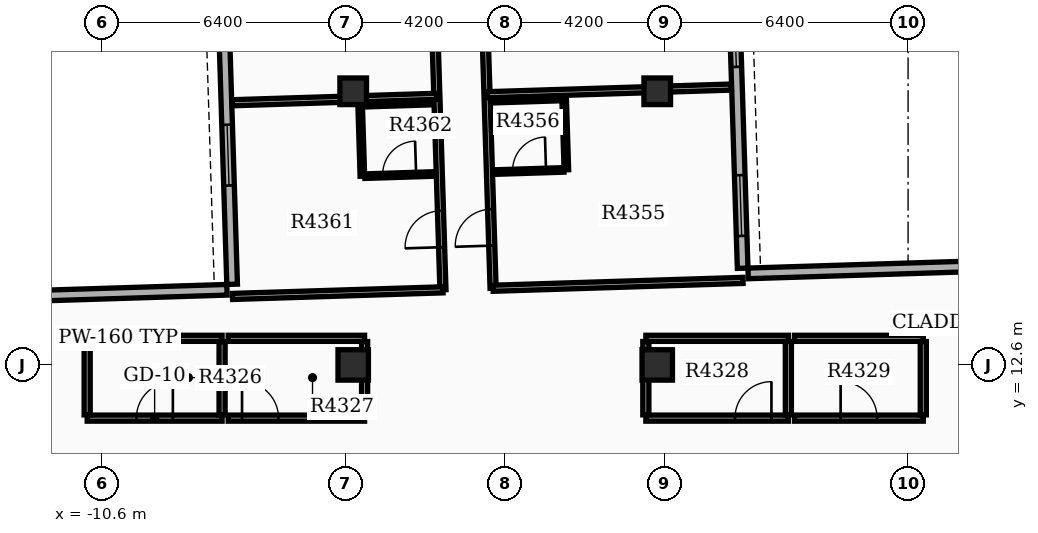
"""IFC4 building model, lengths in metres.
Left out: names, types, materials, properties, quantities, classifications, styles, units other than length and angle.
Written with IfcOpenShell. Run it as: python <this file> out.ifc"""

import sys

from ifc_helpers import new_model, si_unit, direction, frame, frame_2d, origin, origin_2d, place, context, subcontext, project, spatial, rectangle, extrude, element, fill, save


model = new_model("IFC4")
c1 = context("Model", 3, precision=1e-05, world=origin(), true_north=direction((0.0, 1.0)))
c2 = subcontext(c1, "Body", "Model", "MODEL_VIEW")
j1 = project(units=[si_unit("LENGTHUNIT", "METRE"), si_unit("PLANEANGLEUNIT", "RADIAN")], contexts=[c1])
p1 = place(None, origin())
s1 = spatial("IfcSite", under=j1, at=p1, CompositionType="ELEMENT")
p2 = place(p1, origin())
s2 = spatial("IfcBuilding", under=s1, at=p2, CompositionType="ELEMENT")
p3 = place(p2, frame((0.0, 0.0, 273.3)))
s3 = spatial("IfcBuildingStorey", under=s2, at=p3, CompositionType="ELEMENT", Elevation=273.3)
for number, where, z_axis, x_axis in (
    (1, (4.0, 12.6, 0.0), (0.0, 0.0, 1.0), (1.0, 0.0, 0.0)),
    (2, (-4.0, 12.6, 0.0), (0.0, 0.0, 1.0), (1.0, 0.0, 0.0)),
):
    element("IfcColumn", number, at=place(p3, frame(where, z_axis=z_axis, x_axis=x_axis)), inside=s3, PredefinedType="COLUMN", context=c2, shape_type="SweptSolid", body=[
        extrude(rectangle(XDim=0.8, YDim=0.8, at=origin_2d()), origin(), (0.0, 0.0, 1.0), 3.9),
    ])
for number, where, z_axis, x_axis in (
    (3, (-4.0, 19.8, 0.0), (0.0, 0.0, 1.0), (1.0, 0.0, 0.0)),
    (4, (4.0, 19.8, 0.0), (0.0, 0.0, 1.0), (1.0, 0.0, 0.0)),
):
    element("IfcColumn", number, at=place(p3, frame(where, z_axis=z_axis, x_axis=x_axis)), inside=s3, PredefinedType="COLUMN", context=c2, shape_type="SweptSolid", body=[
        extrude(rectangle(XDim=0.7, YDim=0.7, at=origin_2d()), origin(), (0.0, 0.0, 1.0), 3.9),
    ])
p4 = place(p3, frame((6.247, 15.144, 0.0), z_axis=(0.0, 0.0, 1.0), x_axis=(-0.031406376864, 0.999506698073, 0.0)))
e5 = element("IfcWall", 5, at=p4, inside=s3, PredefinedType="STANDARD", context=c2, shape_type="SweptSolid", body=[
    extrude(rectangle(XDim=14.7, YDim=0.28, at=frame_2d((7.35, 0.0))), origin(), (0.0, 0.0, 1.0), 3.18),
])
p5 = place(p4, frame((0.85, 0.0, 0.8)))
e6 = element("IfcOpeningElement", 6, at=p5, cuts=e5, PredefinedType="OPENING", context=c2, shape_type="SweptSolid", body=[
    extrude(rectangle(XDim=1.6, YDim=1.7, at=frame_2d((0.8, 0.85))), frame((0.0, 0.15, 0.0), z_axis=(0.0, -1.0, 0.0), x_axis=(1.0, 0.0, 0.0)), (0.0, 0.0, 1.0), 0.3),
])
p6 = place(p4, frame((5.3, 0.0, 0.8)))
e7 = element("IfcOpeningElement", 7, at=p6, cuts=e5, PredefinedType="OPENING", context=c2, shape_type="SweptSolid", body=[
    extrude(rectangle(XDim=1.6, YDim=1.7, at=frame_2d((0.8, 0.85))), frame((0.0, 0.15, 0.0), z_axis=(0.0, -1.0, 0.0), x_axis=(1.0, 0.0, 0.0)), (0.0, 0.0, 1.0), 0.3),
])
p7 = place(p4, frame((10.75, 0.0, 0.8)))
e8 = element("IfcOpeningElement", 8, at=p7, cuts=e5, PredefinedType="OPENING", context=c2, shape_type="SweptSolid", body=[
    extrude(rectangle(XDim=1.6, YDim=1.7, at=frame_2d((0.8, 0.85))), frame((0.0, 0.15, 0.0), z_axis=(0.0, -1.0, 0.0), x_axis=(1.0, 0.0, 0.0)), (0.0, 0.0, 1.0), 0.3),
])
p8 = place(p3, frame((-7.648, 29.414, 0.0), z_axis=(0.0, 0.0, 1.0), x_axis=(0.031405855522, -0.999506714454, 0.0)))
e9 = element("IfcWall", 9, at=p8, inside=s3, PredefinedType="STANDARD", context=c2, shape_type="SweptSolid", body=[
    extrude(rectangle(XDim=14.7, YDim=0.28, at=frame_2d((7.35, 0.0))), origin(), (0.0, 0.0, 1.0), 3.18),
])
p9 = place(p8, frame((0.85, 0.0, 0.8)))
e10 = element("IfcOpeningElement", 10, at=p9, cuts=e9, PredefinedType="OPENING", context=c2, shape_type="SweptSolid", body=[
    extrude(rectangle(XDim=1.6, YDim=1.7, at=frame_2d((0.8, 0.85))), frame((0.0, 0.15, 0.0), z_axis=(0.0, -1.0, 0.0), x_axis=(1.0, 0.0, 0.0)), (0.0, 0.0, 1.0), 0.3),
])
p10 = place(p8, frame((5.3, 0.0, 0.8)))
e11 = element("IfcOpeningElement", 11, at=p10, cuts=e9, PredefinedType="OPENING", context=c2, shape_type="SweptSolid", body=[
    extrude(rectangle(XDim=1.6, YDim=1.7, at=frame_2d((0.8, 0.85))), frame((0.0, 0.15, 0.0), z_axis=(0.0, -1.0, 0.0), x_axis=(1.0, 0.0, 0.0)), (0.0, 0.0, 1.0), 0.3),
])
p11 = place(p8, frame((10.5, 0.0, 0.8)))
e12 = element("IfcOpeningElement", 12, at=p11, cuts=e9, PredefinedType="OPENING", context=c2, shape_type="SweptSolid", body=[
    extrude(rectangle(XDim=1.6, YDim=1.7, at=frame_2d((0.8, 0.85))), frame((0.0, 0.15, 0.0), z_axis=(0.0, -1.0, 0.0), x_axis=(1.0, 0.0, 0.0)), (0.0, 0.0, 1.0), 0.3),
])
p12 = place(p3, frame((12.689, 15.206, 0.0), z_axis=(0.0, 0.0, 1.0), x_axis=(-0.999507262922, -0.031388395416, 0.0)))
e13 = element("IfcWall", 13, at=p12, inside=s3, PredefinedType="STANDARD", context=c2, shape_type="SweptSolid", body=[
    extrude(rectangle(XDim=6.3, YDim=0.28, at=frame_2d((3.15, 0.0))), origin(), (0.0, 0.0, 1.0), 3.18),
])
p13 = place(p3, frame((-13.618, 14.379, 0.0), z_axis=(0.0, 0.0, 1.0), x_axis=(0.999507224741, 0.031389611199, 0.0)))
e14 = element("IfcWall", 14, at=p13, inside=s3, PredefinedType="STANDARD", context=c2, shape_type="SweptSolid", body=[
    extrude(rectangle(XDim=6.3, YDim=0.28, at=frame_2d((3.15, 0.0))), origin(), (0.0, 0.0, 1.0), 3.18),
])
p14 = place(p3, frame((-11.0, 11.2, 0.0), z_axis=(0.0, 0.0, 1.0), x_axis=(1.0, 0.0, 0.0)))
e15 = element("IfcWall", 15, at=p14, inside=s3, PredefinedType="PARTITIONING", context=c2, shape_type="SweptSolid", body=[
    extrude(rectangle(XDim=3.55, YDim=0.16, at=frame_2d((1.775, 0.0))), origin(), (0.0, 0.0, 1.0), 3.17),
])
p15 = place(p14, frame((1.295, 0.0, 0.0)))
e16 = element("IfcOpeningElement", 16, at=p15, cuts=e15, PredefinedType="OPENING", context=c2, shape_type="SweptSolid", body=[
    extrude(rectangle(XDim=0.96, YDim=2.15, at=frame_2d((0.48, 1.075))), frame((0.0, 0.09, 0.0), z_axis=(0.0, -1.0, 0.0), x_axis=(1.0, 0.0, 0.0)), (0.0, 0.0, 1.0), 0.18),
])
p16 = place(p3, frame((-11.0, 13.3, 0.0), z_axis=(0.0, 0.0, 1.0), x_axis=(1.0, 0.0, 0.0)))
e17 = element("IfcWall", 17, at=p16, inside=s3, PredefinedType="PARTITIONING", context=c2, shape_type="SweptSolid", body=[
    extrude(rectangle(XDim=3.55, YDim=0.16, at=frame_2d((1.775, 0.0))), origin(), (0.0, 0.0, 1.0), 3.17),
])
for number, where, z_axis, x_axis in (
    (18, (-11.0, 11.285, 0.0), (0.0, 0.0, 1.0), (0.0, 1.0, 0.0)),
    (19, (-7.45, 11.285, 0.0), (0.0, 0.0, 1.0), (0.0, 1.0, 0.0)),
):
    element("IfcWall", number, at=place(p3, frame(where, z_axis=z_axis, x_axis=x_axis)), inside=s3, PredefinedType="PARTITIONING", context=c2, shape_type="SweptSolid", body=[
        extrude(rectangle(XDim=1.93, YDim=0.16, at=frame_2d((0.965, 0.0))), origin(), (0.0, 0.0, 1.0), 3.17),
    ])
p17 = place(p3, frame((-7.29, 11.2, 0.0), z_axis=(0.0, 0.0, 1.0), x_axis=(1.0, 0.0, 0.0)))
e20 = element("IfcWall", 20, at=p17, inside=s3, PredefinedType="PARTITIONING", context=c2, shape_type="SweptSolid", body=[
    extrude(rectangle(XDim=3.59, YDim=0.16, at=frame_2d((1.795, 0.0))), origin(), (0.0, 0.0, 1.0), 3.17),
])
p18 = place(p17, frame((0.365, 0.0, 0.0)))
e21 = element("IfcOpeningElement", 21, at=p18, cuts=e20, PredefinedType="OPENING", context=c2, shape_type="SweptSolid", body=[
    extrude(rectangle(XDim=0.96, YDim=2.15, at=frame_2d((0.48, 1.075))), frame((0.0, 0.09, 0.0), z_axis=(0.0, -1.0, 0.0), x_axis=(1.0, 0.0, 0.0)), (0.0, 0.0, 1.0), 0.18),
])
p19 = place(p3, frame((-7.29, 13.3, 0.0), z_axis=(0.0, 0.0, 1.0), x_axis=(1.0, 0.0, 0.0)))
e22 = element("IfcWall", 22, at=p19, inside=s3, PredefinedType="PARTITIONING", context=c2, shape_type="SweptSolid", body=[
    extrude(rectangle(XDim=3.59, YDim=0.16, at=frame_2d((1.795, 0.0))), origin(), (0.0, 0.0, 1.0), 3.17),
])
p20 = place(p3, frame((-3.7, 11.285, 0.0), z_axis=(0.0, 0.0, 1.0), x_axis=(0.0, 1.0, 0.0)))
e23 = element("IfcWall", 23, at=p20, inside=s3, PredefinedType="PARTITIONING", context=c2, shape_type="SweptSolid", body=[
    extrude(rectangle(XDim=1.93, YDim=0.16, at=frame_2d((0.965, 0.0))), origin(), (0.0, 0.0, 1.0), 3.17),
])
p21 = place(p3, frame((3.7, 11.2, 0.0), z_axis=(0.0, 0.0, 1.0), x_axis=(1.0, 0.0, 0.0)))
e24 = element("IfcWall", 24, at=p21, inside=s3, PredefinedType="PARTITIONING", context=c2, shape_type="SweptSolid", body=[
    extrude(rectangle(XDim=3.75, YDim=0.16, at=frame_2d((1.875, 0.0))), origin(), (0.0, 0.0, 1.0), 3.17),
])
p22 = place(p21, frame((2.345, 0.0, 0.0)))
e25 = element("IfcOpeningElement", 25, at=p22, cuts=e24, PredefinedType="OPENING", context=c2, shape_type="SweptSolid", body=[
    extrude(rectangle(XDim=0.96, YDim=2.15, at=frame_2d((0.48, 1.075))), frame((0.0, 0.09, 0.0), z_axis=(0.0, -1.0, 0.0), x_axis=(1.0, 0.0, 0.0)), (0.0, 0.0, 1.0), 0.18),
])
p23 = place(p3, frame((3.7, 13.3, 0.0), z_axis=(0.0, 0.0, 1.0), x_axis=(1.0, 0.0, 0.0)))
e26 = element("IfcWall", 26, at=p23, inside=s3, PredefinedType="PARTITIONING", context=c2, shape_type="SweptSolid", body=[
    extrude(rectangle(XDim=3.75, YDim=0.16, at=frame_2d((1.875, 0.0))), origin(), (0.0, 0.0, 1.0), 3.17),
])
for number, where, z_axis, x_axis in (
    (27, (3.7, 11.285, 0.0), (0.0, 0.0, 1.0), (0.0, 1.0, 0.0)),
    (28, (7.45, 11.285, 0.0), (0.0, 0.0, 1.0), (0.0, 1.0, 0.0)),
):
    element("IfcWall", number, at=place(p3, frame(where, z_axis=z_axis, x_axis=x_axis)), inside=s3, PredefinedType="PARTITIONING", context=c2, shape_type="SweptSolid", body=[
        extrude(rectangle(XDim=1.93, YDim=0.16, at=frame_2d((0.965, 0.0))), origin(), (0.0, 0.0, 1.0), 3.17),
    ])
p24 = place(p3, frame((7.61, 11.2, 0.0), z_axis=(0.0, 0.0, 1.0), x_axis=(1.0, 0.0, 0.0)))
e29 = element("IfcWall", 29, at=p24, inside=s3, PredefinedType="PARTITIONING", context=c2, shape_type="SweptSolid", body=[
    extrude(rectangle(XDim=3.39, YDim=0.16, at=frame_2d((1.695, 0.0))), origin(), (0.0, 0.0, 1.0), 3.17),
])
p25 = place(p24, frame((1.215, 0.0, 0.0)))
e30 = element("IfcOpeningElement", 30, at=p25, cuts=e29, PredefinedType="OPENING", context=c2, shape_type="SweptSolid", body=[
    extrude(rectangle(XDim=0.96, YDim=2.15, at=frame_2d((0.48, 1.075))), frame((0.0, 0.09, 0.0), z_axis=(0.0, -1.0, 0.0), x_axis=(1.0, 0.0, 0.0)), (0.0, 0.0, 1.0), 0.18),
])
p26 = place(p3, frame((7.61, 13.3, 0.0), z_axis=(0.0, 0.0, 1.0), x_axis=(1.0, 0.0, 0.0)))
e31 = element("IfcWall", 31, at=p26, inside=s3, PredefinedType="PARTITIONING", context=c2, shape_type="SweptSolid", body=[
    extrude(rectangle(XDim=3.39, YDim=0.16, at=frame_2d((1.695, 0.0))), origin(), (0.0, 0.0, 1.0), 3.17),
])
p27 = place(p3, frame((11.0, 11.285, 0.0), z_axis=(0.0, 0.0, 1.0), x_axis=(0.0, 1.0, 0.0)))
e32 = element("IfcWall", 32, at=p27, inside=s3, PredefinedType="PARTITIONING", context=c2, shape_type="SweptSolid", body=[
    extrude(rectangle(XDim=1.93, YDim=0.16, at=frame_2d((0.965, 0.0))), origin(), (0.0, 0.0, 1.0), 3.17),
])
p28 = place(p3, frame((-0.319, 14.617, 0.0), z_axis=(0.0, 0.0, 1.0), x_axis=(-0.03142007044, 0.999506267701, 0.0)))
e33 = element("IfcWall", 33, at=p28, inside=s3, PredefinedType="PARTITIONING", context=c2, shape_type="SweptSolid", body=[
    extrude(rectangle(XDim=15.012, YDim=0.16, at=frame_2d((7.506, 0.0))), origin(), (0.0, 0.0, 1.0), 3.17),
])
p29 = place(p28, frame((1.122, 0.0, 0.0)))
e34 = element("IfcOpeningElement", 34, at=p29, cuts=e33, PredefinedType="OPENING", context=c2, shape_type="SweptSolid", body=[
    extrude(rectangle(XDim=0.96, YDim=2.15, at=frame_2d((0.48, 1.075))), frame((0.0, 0.09, 0.0), z_axis=(0.0, -1.0, 0.0), x_axis=(1.0, 0.0, 0.0)), (0.0, 0.0, 1.0), 0.18),
])
p30 = place(p28, frame((6.858, 0.0, 0.0)))
e35 = element("IfcOpeningElement", 35, at=p30, cuts=e33, PredefinedType="OPENING", context=c2, shape_type="SweptSolid", body=[
    extrude(rectangle(XDim=0.96, YDim=2.15, at=frame_2d((0.48, 1.075))), frame((0.0, 0.09, 0.0), z_axis=(0.0, -1.0, 0.0), x_axis=(1.0, 0.0, 0.0)), (0.0, 0.0, 1.0), 0.18),
])
p31 = place(p28, frame((11.628, 0.0, 0.0)))
e36 = element("IfcOpeningElement", 36, at=p31, cuts=e33, PredefinedType="OPENING", context=c2, shape_type="SweptSolid", body=[
    extrude(rectangle(XDim=0.96, YDim=2.15, at=frame_2d((0.48, 1.075))), frame((0.0, 0.09, 0.0), z_axis=(0.0, -1.0, 0.0), x_axis=(1.0, 0.0, 0.0)), (0.0, 0.0, 1.0), 0.18),
])
p32 = place(p3, frame((-0.319, 14.617, 0.0), z_axis=(0.0, 0.0, 1.0), x_axis=(0.999506085206, 0.03142587528, 0.0)))
e37 = element("IfcWall", 37, at=p32, inside=s3, PredefinedType="PARTITIONING", context=c2, shape_type="SweptSolid", body=[
    extrude(rectangle(XDim=6.58, YDim=0.16, at=frame_2d((3.29, 0.0))), origin(), (0.0, 0.0, 1.0), 3.17),
])
p33 = place(p3, frame((-0.479, 19.709, 0.0), z_axis=(0.0, 0.0, 1.0), x_axis=(0.999507175611, 0.031391175537, 0.0)))
e38 = element("IfcWall", 38, at=p33, inside=s3, PredefinedType="PARTITIONING", context=c2, shape_type="SweptSolid", body=[
    extrude(rectangle(XDim=6.432, YDim=0.16, at=frame_2d((3.216, 0.0))), origin(), (0.0, 0.0, 1.0), 3.17),
])
p34 = place(p3, frame((-0.275, 17.674, 0.0), z_axis=(0.0, 0.0, 1.0), x_axis=(0.999507221803, 0.031389704724, 0.0)))
e39 = element("IfcWall", 39, at=p34, inside=s3, PredefinedType="PARTITIONING", context=c2, shape_type="SweptSolid", body=[
    extrude(rectangle(XDim=1.82, YDim=0.12, at=frame_2d((0.91, 0.0))), origin(), (0.0, 0.0, 1.0), 3.17),
])
p35 = place(p34, frame((0.47, 0.0, 0.0)))
e40 = element("IfcOpeningElement", 40, at=p35, cuts=e39, PredefinedType="OPENING", context=c2, shape_type="SweptSolid", body=[
    extrude(rectangle(XDim=0.88, YDim=2.1, at=frame_2d((0.44, 1.05))), frame((0.0, 0.07, 0.0), z_axis=(0.0, -1.0, 0.0), x_axis=(1.0, 0.0, 0.0)), (0.0, 0.0, 1.0), 0.14),
])
p36 = place(p3, frame((-0.334, 19.553, 0.0), z_axis=(0.0, 0.0, 1.0), x_axis=(0.999503004171, 0.03152371574, 0.0)))
e41 = element("IfcWall", 41, at=p36, inside=s3, PredefinedType="PARTITIONING", context=c2, shape_type="SweptSolid", body=[
    extrude(rectangle(XDim=1.82, YDim=0.12, at=frame_2d((0.91, 0.0))), origin(), (0.0, 0.0, 1.0), 3.17),
])
p37 = place(p3, frame((1.609, 17.733, 0.0), z_axis=(0.0, 0.0, 1.0), x_axis=(-0.031429371883, 0.999505975261, 0.0)))
e42 = element("IfcWall", 42, at=p37, inside=s3, PredefinedType="PARTITIONING", context=c2, shape_type="SweptSolid", body=[
    extrude(rectangle(XDim=1.88, YDim=0.12, at=frame_2d((0.94, 0.0))), origin(), (0.0, 0.0, 1.0), 3.17),
])
p38 = place(p3, frame((-1.639, 14.576, 0.0), z_axis=(0.0, 0.0, 1.0), x_axis=(-0.031403823507, 0.999506778301, 0.0)))
e43 = element("IfcWall", 43, at=p38, inside=s3, PredefinedType="PARTITIONING", context=c2, shape_type="SweptSolid", body=[
    extrude(rectangle(XDim=15.012, YDim=0.16, at=frame_2d((7.506, 0.0))), origin(), (0.0, 0.0, 1.0), 3.17),
])
p39 = place(p38, frame((1.122, 0.0, 0.0)))
e44 = element("IfcOpeningElement", 44, at=p39, cuts=e43, PredefinedType="OPENING", context=c2, shape_type="SweptSolid", body=[
    extrude(rectangle(XDim=0.96, YDim=2.15, at=frame_2d((0.48, 1.075))), frame((0.0, 0.09, 0.0), z_axis=(0.0, -1.0, 0.0), x_axis=(1.0, 0.0, 0.0)), (0.0, 0.0, 1.0), 0.18),
])
p40 = place(p38, frame((6.858, 0.0, 0.0)))
e45 = element("IfcOpeningElement", 45, at=p40, cuts=e43, PredefinedType="OPENING", context=c2, shape_type="SweptSolid", body=[
    extrude(rectangle(XDim=0.96, YDim=2.15, at=frame_2d((0.48, 1.075))), frame((0.0, 0.09, 0.0), z_axis=(0.0, -1.0, 0.0), x_axis=(1.0, 0.0, 0.0)), (0.0, 0.0, 1.0), 0.18),
])
p41 = place(p38, frame((11.628, 0.0, 0.0)))
e46 = element("IfcOpeningElement", 46, at=p41, cuts=e43, PredefinedType="OPENING", context=c2, shape_type="SweptSolid", body=[
    extrude(rectangle(XDim=0.96, YDim=2.15, at=frame_2d((0.48, 1.075))), frame((0.0, 0.09, 0.0), z_axis=(0.0, -1.0, 0.0), x_axis=(1.0, 0.0, 0.0)), (0.0, 0.0, 1.0), 0.18),
])
p42 = place(p3, frame((-1.639, 14.576, 0.0), z_axis=(0.0, 0.0, 1.0), x_axis=(-0.999506211244, -0.031421866341, 0.0)))
e47 = element("IfcWall", 47, at=p42, inside=s3, PredefinedType="PARTITIONING", context=c2, shape_type="SweptSolid", body=[
    extrude(rectangle(XDim=5.54, YDim=0.16, at=frame_2d((2.77, 0.0))), origin(), (0.0, 0.0, 1.0), 3.17),
])
p43 = place(p3, frame((-1.799, 19.667, 0.0), z_axis=(0.0, 0.0, 1.0), x_axis=(-0.999506183343, -0.03142275385, 0.0)))
e48 = element("IfcWall", 48, at=p43, inside=s3, PredefinedType="PARTITIONING", context=c2, shape_type="SweptSolid", body=[
    extrude(rectangle(XDim=5.392, YDim=0.16, at=frame_2d((2.696, 0.0))), origin(), (0.0, 0.0, 1.0), 3.17),
])
p44 = place(p3, frame((-3.694, 17.567, 0.0), z_axis=(0.0, 0.0, 1.0), x_axis=(0.999507221803, 0.031389704724, 0.0)))
e49 = element("IfcWall", 49, at=p44, inside=s3, PredefinedType="PARTITIONING", context=c2, shape_type="SweptSolid", body=[
    extrude(rectangle(XDim=1.82, YDim=0.12, at=frame_2d((0.91, 0.0))), origin(), (0.0, 0.0, 1.0), 3.17),
])
p45 = place(p44, frame((0.47, 0.0, 0.0)))
e50 = element("IfcOpeningElement", 50, at=p45, cuts=e49, PredefinedType="OPENING", context=c2, shape_type="SweptSolid", body=[
    extrude(rectangle(XDim=0.88, YDim=2.1, at=frame_2d((0.44, 1.05))), frame((0.0, 0.07, 0.0), z_axis=(0.0, -1.0, 0.0), x_axis=(1.0, 0.0, 0.0)), (0.0, 0.0, 1.0), 0.14),
])
p46 = place(p3, frame((-3.753, 19.446, 0.0), z_axis=(0.0, 0.0, 1.0), x_axis=(0.999507221803, 0.031389704724, 0.0)))
e51 = element("IfcWall", 51, at=p46, inside=s3, PredefinedType="PARTITIONING", context=c2, shape_type="SweptSolid", body=[
    extrude(rectangle(XDim=1.82, YDim=0.12, at=frame_2d((0.91, 0.0))), origin(), (0.0, 0.0, 1.0), 3.17),
])
p47 = place(p3, frame((-3.759, 17.565, 0.0), z_axis=(0.0, 0.0, 1.0), x_axis=(-0.031429371883, 0.999505975261, 0.0)))
e52 = element("IfcWall", 52, at=p47, inside=s3, PredefinedType="PARTITIONING", context=c2, shape_type="SweptSolid", body=[
    extrude(rectangle(XDim=1.88, YDim=0.12, at=frame_2d((0.94, 0.0))), origin(), (0.0, 0.0, 1.0), 3.17),
])
p48 = place(p5, origin())
e53 = element("IfcWindow", 53, at=p48, inside=s3, PartitioningType="SINGLE_PANEL", PredefinedType="WINDOW", context=c2, shape_type="SweptSolid", body=[
    extrude(rectangle(XDim=1.6, YDim=1.7, at=frame_2d((0.8, 0.85))), frame((0.0, 0.03, 0.0), z_axis=(0.0, -1.0, 0.0), x_axis=(1.0, 0.0, 0.0)), (0.0, 0.0, 1.0), 0.06),
])
fill(e6, e53)
p49 = place(p6, origin())
e54 = element("IfcWindow", 54, at=p49, inside=s3, PartitioningType="SINGLE_PANEL", PredefinedType="WINDOW", context=c2, shape_type="SweptSolid", body=[
    extrude(rectangle(XDim=1.6, YDim=1.7, at=frame_2d((0.8, 0.85))), frame((0.0, 0.03, 0.0), z_axis=(0.0, -1.0, 0.0), x_axis=(1.0, 0.0, 0.0)), (0.0, 0.0, 1.0), 0.06),
])
fill(e7, e54)
p50 = place(p11, origin())
e55 = element("IfcWindow", 55, at=p50, inside=s3, PartitioningType="SINGLE_PANEL", PredefinedType="WINDOW", context=c2, shape_type="SweptSolid", body=[
    extrude(rectangle(XDim=1.6, YDim=1.7, at=frame_2d((0.8, 0.85))), frame((0.0, 0.03, 0.0), z_axis=(0.0, -1.0, 0.0), x_axis=(1.0, 0.0, 0.0)), (0.0, 0.0, 1.0), 0.06),
])
fill(e12, e55)
p51 = place(p15, origin())
e56 = element("IfcDoor", 56, at=p51, inside=s3, OperationType="SINGLE_SWING_RIGHT", PredefinedType="DOOR", context=c2, shape_type="SweptSolid", body=[
    extrude(rectangle(XDim=0.96, YDim=2.15, at=frame_2d((0.48, 1.075))), frame((0.0, 0.025, 0.0), z_axis=(0.0, -1.0, 0.0), x_axis=(1.0, 0.0, 0.0)), (0.0, 0.0, 1.0), 0.05),
])
fill(e16, e56)
p52 = place(p18, origin())
e57 = element("IfcDoor", 57, at=p52, inside=s3, OperationType="SINGLE_SWING_LEFT", PredefinedType="DOOR", context=c2, shape_type="SweptSolid", body=[
    extrude(rectangle(XDim=0.96, YDim=2.15, at=frame_2d((0.48, 1.075))), frame((0.0, 0.025, 0.0), z_axis=(0.0, -1.0, 0.0), x_axis=(1.0, 0.0, 0.0)), (0.0, 0.0, 1.0), 0.05),
])
fill(e21, e57)
p53 = place(p22, origin())
e58 = element("IfcDoor", 58, at=p53, inside=s3, OperationType="SINGLE_SWING_RIGHT", PredefinedType="DOOR", context=c2, shape_type="SweptSolid", body=[
    extrude(rectangle(XDim=0.96, YDim=2.15, at=frame_2d((0.48, 1.075))), frame((0.0, 0.025, 0.0), z_axis=(0.0, -1.0, 0.0), x_axis=(1.0, 0.0, 0.0)), (0.0, 0.0, 1.0), 0.05),
])
fill(e25, e58)
p54 = place(p25, origin())
e59 = element("IfcDoor", 59, at=p54, inside=s3, OperationType="SINGLE_SWING_LEFT", PredefinedType="DOOR", context=c2, shape_type="SweptSolid", body=[
    extrude(rectangle(XDim=0.96, YDim=2.15, at=frame_2d((0.48, 1.075))), frame((0.0, 0.025, 0.0), z_axis=(0.0, -1.0, 0.0), x_axis=(1.0, 0.0, 0.0)), (0.0, 0.0, 1.0), 0.05),
])
fill(e30, e59)
p55 = place(p29, origin())
e60 = element("IfcDoor", 60, at=p55, inside=s3, OperationType="SINGLE_SWING_LEFT", PredefinedType="DOOR", context=c2, shape_type="SweptSolid", body=[
    extrude(rectangle(XDim=0.96, YDim=2.15, at=frame_2d((0.48, 1.075))), frame((0.0, 0.025, 0.0), z_axis=(0.0, -1.0, 0.0), x_axis=(1.0, 0.0, 0.0)), (0.0, 0.0, 1.0), 0.05),
])
fill(e34, e60)
p56 = place(p35, origin())
e61 = element("IfcDoor", 61, at=p56, inside=s3, OperationType="SINGLE_SWING_RIGHT", PredefinedType="DOOR", context=c2, shape_type="SweptSolid", body=[
    extrude(rectangle(XDim=0.88, YDim=2.1, at=frame_2d((0.44, 1.05))), frame((0.0, 0.025, 0.0), z_axis=(0.0, -1.0, 0.0), x_axis=(1.0, 0.0, 0.0)), (0.0, 0.0, 1.0), 0.05),
])
fill(e40, e61)
p57 = place(p39, origin())
e62 = element("IfcDoor", 62, at=p57, inside=s3, OperationType="SINGLE_SWING_LEFT", PredefinedType="DOOR", context=c2, shape_type="SweptSolid", body=[
    extrude(rectangle(XDim=0.96, YDim=2.15, at=frame_2d((0.48, 1.075))), frame((0.0, 0.025, 0.0), z_axis=(0.0, -1.0, 0.0), x_axis=(1.0, 0.0, 0.0)), (0.0, 0.0, 1.0), 0.05),
])
fill(e44, e62)
p58 = place(p45, origin())
e63 = element("IfcDoor", 63, at=p58, inside=s3, OperationType="SINGLE_SWING_RIGHT", PredefinedType="DOOR", context=c2, shape_type="SweptSolid", body=[
    extrude(rectangle(XDim=0.88, YDim=2.1, at=frame_2d((0.44, 1.05))), frame((0.0, 0.025, 0.0), z_axis=(0.0, -1.0, 0.0), x_axis=(1.0, 0.0, 0.0)), (0.0, 0.0, 1.0), 0.05),
])
fill(e50, e63)
save(model, sys.argv[1])
